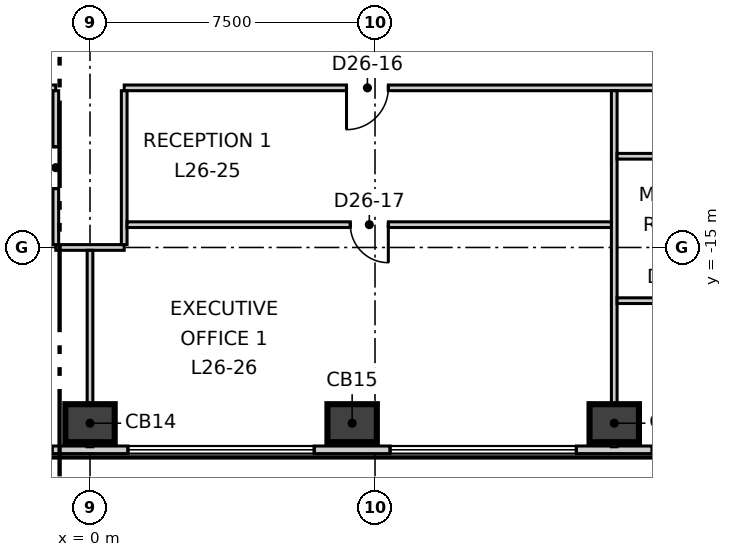
"""IFC4 building model, lengths in metres.
Left out: names, types, materials, properties, quantities, classifications, styles, units other than length and angle.
Written with IfcOpenShell. Run it as: python <this file> out.ifc"""

import sys

from ifc_helpers import new_model, si_unit, direction, frame, frame_2d, origin, origin_2d, place, context, subcontext, project, spatial, rectangle, extrude, element, fill, save


model = new_model("IFC4")
c1 = context("Model", 3, precision=1e-05, world=origin(), true_north=direction((0.0, 1.0)))
c2 = subcontext(c1, "Body", "Model", "MODEL_VIEW")
j1 = project(units=[si_unit("LENGTHUNIT", "METRE"), si_unit("PLANEANGLEUNIT", "RADIAN")], contexts=[c1])
p1 = place(None, origin())
s1 = spatial("IfcSite", under=j1, at=p1, CompositionType="ELEMENT")
p2 = place(p1, origin())
s2 = spatial("IfcBuilding", under=s1, at=p2, CompositionType="ELEMENT")
p3 = place(p2, frame((0.0, 0.0, 116.3)))
s3 = spatial("IfcBuildingStorey", under=s2, at=p3, CompositionType="ELEMENT", Elevation=116.3)
for number, where, z_axis, x_axis in (
    (1, (0.0, -19.624, -0.3), (0.0, 0.0, 1.0), (1.0, 0.0, 0.0)),
    (2, (6.898, -19.624, -0.3), (0.0, 0.0, 1.0), (1.0, 0.0, 0.0)),
    (3, (13.795, -19.624, -0.3), (0.0, 0.0, 1.0), (1.0, 0.0, 0.0)),
):
    element("IfcColumn", number, at=place(p3, frame(where, z_axis=z_axis, x_axis=x_axis)), inside=s3, PredefinedType="COLUMN", context=c2, shape_type="SweptSolid", body=[
        extrude(rectangle(XDim=1.3, YDim=1.0, at=origin_2d()), origin(), (0.0, 0.0, 1.0), 4.0),
    ])
p4 = place(p3, frame((-28.894, -20.324, 0.0), z_axis=(0.0, 0.0, 1.0), x_axis=(1.0, 0.0, 0.0)))
e4 = element("IfcWall", 4, at=p4, inside=s3, PredefinedType="ELEMENTEDWALL", context=c2, shape_type="SweptSolid", body=[
    extrude(rectangle(XDim=57.768, YDim=0.2, at=frame_2d((28.884, 0.0))), origin(), (0.0, 0.0, 1.0), 3.7),
])
p5 = place(p4, frame((2.302, 0.0, 0.9)))
e5 = element("IfcOpeningElement", 5, at=p5, cuts=e4, PredefinedType="OPENING", context=c2, shape_type="SweptSolid", body=[
    extrude(rectangle(XDim=4.9, YDim=2.5, at=frame_2d((2.45, 1.25))), frame((0.0, 0.11, 0.0), z_axis=(0.0, -1.0, 0.0), x_axis=(1.0, 0.0, 0.0)), (0.0, 0.0, 1.0), 0.22),
])
p6 = place(p4, frame((9.2, 0.0, 0.9)))
e6 = element("IfcOpeningElement", 6, at=p6, cuts=e4, PredefinedType="OPENING", context=c2, shape_type="SweptSolid", body=[
    extrude(rectangle(XDim=4.9, YDim=2.5, at=frame_2d((2.45, 1.25))), frame((0.0, 0.11, 0.0), z_axis=(0.0, -1.0, 0.0), x_axis=(1.0, 0.0, 0.0)), (0.0, 0.0, 1.0), 0.22),
])
p7 = place(p4, frame((16.097, 0.0, 0.9)))
e7 = element("IfcOpeningElement", 7, at=p7, cuts=e4, PredefinedType="OPENING", context=c2, shape_type="SweptSolid", body=[
    extrude(rectangle(XDim=4.9, YDim=2.5, at=frame_2d((2.45, 1.25))), frame((0.0, 0.11, 0.0), z_axis=(0.0, -1.0, 0.0), x_axis=(1.0, 0.0, 0.0)), (0.0, 0.0, 1.0), 0.22),
])
p8 = place(p4, frame((22.995, 0.0, 0.9)))
e8 = element("IfcOpeningElement", 8, at=p8, cuts=e4, PredefinedType="OPENING", context=c2, shape_type="SweptSolid", body=[
    extrude(rectangle(XDim=4.9, YDim=2.5, at=frame_2d((2.45, 1.25))), frame((0.0, 0.11, 0.0), z_axis=(0.0, -1.0, 0.0), x_axis=(1.0, 0.0, 0.0)), (0.0, 0.0, 1.0), 0.22),
])
p9 = place(p4, frame((29.893, 0.0, 0.9)))
e9 = element("IfcOpeningElement", 9, at=p9, cuts=e4, PredefinedType="OPENING", context=c2, shape_type="SweptSolid", body=[
    extrude(rectangle(XDim=4.9, YDim=2.5, at=frame_2d((2.45, 1.25))), frame((0.0, 0.11, 0.0), z_axis=(0.0, -1.0, 0.0), x_axis=(1.0, 0.0, 0.0)), (0.0, 0.0, 1.0), 0.22),
])
p10 = place(p4, frame((36.791, 0.0, 0.9)))
e10 = element("IfcOpeningElement", 10, at=p10, cuts=e4, PredefinedType="OPENING", context=c2, shape_type="SweptSolid", body=[
    extrude(rectangle(XDim=4.9, YDim=2.5, at=frame_2d((2.45, 1.25))), frame((0.0, 0.11, 0.0), z_axis=(0.0, -1.0, 0.0), x_axis=(1.0, 0.0, 0.0)), (0.0, 0.0, 1.0), 0.22),
])
p11 = place(p4, frame((43.688, 0.0, 0.9)))
e11 = element("IfcOpeningElement", 11, at=p11, cuts=e4, PredefinedType="OPENING", context=c2, shape_type="SweptSolid", body=[
    extrude(rectangle(XDim=4.9, YDim=2.5, at=frame_2d((2.45, 1.25))), frame((0.0, 0.11, 0.0), z_axis=(0.0, -1.0, 0.0), x_axis=(1.0, 0.0, 0.0)), (0.0, 0.0, 1.0), 0.22),
])
p12 = place(p4, frame((50.586, 0.0, 0.9)))
e12 = element("IfcOpeningElement", 12, at=p12, cuts=e4, PredefinedType="OPENING", context=c2, shape_type="SweptSolid", body=[
    extrude(rectangle(XDim=4.9, YDim=2.5, at=frame_2d((2.45, 1.25))), frame((0.0, 0.11, 0.0), z_axis=(0.0, -1.0, 0.0), x_axis=(1.0, 0.0, 0.0)), (0.0, 0.0, 1.0), 0.22),
])
p13 = place(p3, frame((32.048, -14.861, 0.0), z_axis=(0.0, 0.0, 1.0), x_axis=(-0.499996704161, 0.866027306629, 0.0)))
e13 = element("IfcWall", 13, at=p13, inside=s3, PredefinedType="ELEMENTEDWALL", context=c2, shape_type="SweptSolid", body=[
    extrude(rectangle(XDim=57.769, YDim=0.2, at=frame_2d((28.884, 0.0))), origin(), (0.0, 0.0, 1.0), 3.7),
])
p14 = place(p13, frame((2.302, 0.0, 0.9)))
e14 = element("IfcOpeningElement", 14, at=p14, cuts=e13, PredefinedType="OPENING", context=c2, shape_type="SweptSolid", body=[
    extrude(rectangle(XDim=4.9, YDim=2.5, at=frame_2d((2.45, 1.25))), frame((0.0, 0.11, 0.0), z_axis=(0.0, -1.0, 0.0), x_axis=(1.0, 0.0, 0.0)), (0.0, 0.0, 1.0), 0.22),
])
p15 = place(p13, frame((9.199, 0.0, 0.9)))
e15 = element("IfcOpeningElement", 15, at=p15, cuts=e13, PredefinedType="OPENING", context=c2, shape_type="SweptSolid", body=[
    extrude(rectangle(XDim=4.9, YDim=2.5, at=frame_2d((2.45, 1.25))), frame((0.0, 0.11, 0.0), z_axis=(0.0, -1.0, 0.0), x_axis=(1.0, 0.0, 0.0)), (0.0, 0.0, 1.0), 0.22),
])
p16 = place(p13, frame((16.097, 0.0, 0.9)))
e16 = element("IfcOpeningElement", 16, at=p16, cuts=e13, PredefinedType="OPENING", context=c2, shape_type="SweptSolid", body=[
    extrude(rectangle(XDim=4.9, YDim=2.5, at=frame_2d((2.45, 1.25))), frame((0.0, 0.11, 0.0), z_axis=(0.0, -1.0, 0.0), x_axis=(1.0, 0.0, 0.0)), (0.0, 0.0, 1.0), 0.22),
])
p17 = place(p13, frame((22.995, 0.0, 0.9)))
e17 = element("IfcOpeningElement", 17, at=p17, cuts=e13, PredefinedType="OPENING", context=c2, shape_type="SweptSolid", body=[
    extrude(rectangle(XDim=4.9, YDim=2.5, at=frame_2d((2.45, 1.25))), frame((0.0, 0.11, 0.0), z_axis=(0.0, -1.0, 0.0), x_axis=(1.0, 0.0, 0.0)), (0.0, 0.0, 1.0), 0.22),
])
p18 = place(p13, frame((29.893, 0.0, 0.9)))
e18 = element("IfcOpeningElement", 18, at=p18, cuts=e13, PredefinedType="OPENING", context=c2, shape_type="SweptSolid", body=[
    extrude(rectangle(XDim=4.9, YDim=2.5, at=frame_2d((2.45, 1.25))), frame((0.0, 0.11, 0.0), z_axis=(0.0, -1.0, 0.0), x_axis=(1.0, 0.0, 0.0)), (0.0, 0.0, 1.0), 0.22),
])
p19 = place(p13, frame((36.791, 0.0, 0.9)))
e19 = element("IfcOpeningElement", 19, at=p19, cuts=e13, PredefinedType="OPENING", context=c2, shape_type="SweptSolid", body=[
    extrude(rectangle(XDim=4.9, YDim=2.5, at=frame_2d((2.45, 1.25))), frame((0.0, 0.11, 0.0), z_axis=(0.0, -1.0, 0.0), x_axis=(1.0, 0.0, 0.0)), (0.0, 0.0, 1.0), 0.22),
])
p20 = place(p13, frame((43.689, 0.0, 0.9)))
e20 = element("IfcOpeningElement", 20, at=p20, cuts=e13, PredefinedType="OPENING", context=c2, shape_type="SweptSolid", body=[
    extrude(rectangle(XDim=4.9, YDim=2.5, at=frame_2d((2.45, 1.25))), frame((0.0, 0.11, 0.0), z_axis=(0.0, -1.0, 0.0), x_axis=(1.0, 0.0, 0.0)), (0.0, 0.0, 1.0), 0.22),
])
p21 = place(p13, frame((50.587, 0.0, 0.9)))
e21 = element("IfcOpeningElement", 21, at=p21, cuts=e13, PredefinedType="OPENING", context=c2, shape_type="SweptSolid", body=[
    extrude(rectangle(XDim=4.9, YDim=2.5, at=frame_2d((2.45, 1.25))), frame((0.0, 0.11, 0.0), z_axis=(0.0, -1.0, 0.0), x_axis=(1.0, 0.0, 0.0)), (0.0, 0.0, 1.0), 0.22),
])
p22 = place(p3, frame((-18.555, -10.8, 0.0), z_axis=(0.0, 0.0, 1.0), x_axis=(1.0, 0.0, 0.0)))
e22 = element("IfcWall", 22, at=p22, inside=s3, PredefinedType="PARTITIONING", context=c2, shape_type="SweptSolid", body=[
    extrude(rectangle(XDim=17.654, YDim=0.15, at=frame_2d((8.827, 0.0))), origin(), (0.0, 0.0, 1.0), 3.7),
])
p23 = place(p22, frame((1.8, 0.0, 0.0)))
e23 = element("IfcOpeningElement", 23, at=p23, cuts=e22, PredefinedType="OPENING", context=c2, shape_type="SweptSolid", body=[
    extrude(rectangle(XDim=1.1, YDim=2.1, at=frame_2d((0.55, 1.05))), frame((0.0, 0.085, 0.0), z_axis=(0.0, -1.0, 0.0), x_axis=(1.0, 0.0, 0.0)), (0.0, 0.0, 1.0), 0.17),
])
p24 = place(p22, frame((5.909, 0.0, 0.0)))
e24 = element("IfcOpeningElement", 24, at=p24, cuts=e22, PredefinedType="OPENING", context=c2, shape_type="SweptSolid", body=[
    extrude(rectangle(XDim=0.9, YDim=2.1, at=frame_2d((0.45, 1.05))), frame((0.0, 0.085, 0.0), z_axis=(0.0, -1.0, 0.0), x_axis=(1.0, 0.0, 0.0)), (0.0, 0.0, 1.0), 0.17),
])
p25 = place(p22, frame((9.109, 0.0, 0.0)))
e25 = element("IfcOpeningElement", 25, at=p25, cuts=e22, PredefinedType="OPENING", context=c2, shape_type="SweptSolid", body=[
    extrude(rectangle(XDim=0.9, YDim=2.1, at=frame_2d((0.45, 1.05))), frame((0.0, 0.085, 0.0), z_axis=(0.0, -1.0, 0.0), x_axis=(1.0, 0.0, 0.0)), (0.0, 0.0, 1.0), 0.17),
])
p26 = place(p22, frame((11.809, 0.0, 0.0)))
e26 = element("IfcOpeningElement", 26, at=p26, cuts=e22, PredefinedType="OPENING", context=c2, shape_type="SweptSolid", body=[
    extrude(rectangle(XDim=1.0, YDim=2.1, at=frame_2d((0.5, 1.05))), frame((0.0, 0.085, 0.0), z_axis=(0.0, -1.0, 0.0), x_axis=(1.0, 0.0, 0.0)), (0.0, 0.0, 1.0), 0.17),
])
p27 = place(p3, frame((0.901, -10.8, 0.0), z_axis=(0.0, 0.0, 1.0), x_axis=(1.0, 0.0, 0.0)))
e27 = element("IfcWall", 27, at=p27, inside=s3, PredefinedType="PARTITIONING", context=c2, shape_type="SweptSolid", body=[
    extrude(rectangle(XDim=17.804, YDim=0.15, at=frame_2d((8.902, 0.0))), origin(), (0.0, 0.0, 1.0), 3.7),
])
p28 = place(p27, frame((5.849, 0.0, 0.0)))
e28 = element("IfcOpeningElement", 28, at=p28, cuts=e27, PredefinedType="OPENING", context=c2, shape_type="SweptSolid", body=[
    extrude(rectangle(XDim=1.1, YDim=2.1, at=frame_2d((0.55, 1.05))), frame((0.0, 0.085, 0.0), z_axis=(0.0, -1.0, 0.0), x_axis=(1.0, 0.0, 0.0)), (0.0, 0.0, 1.0), 0.17),
])
p29 = place(p27, frame((14.844, 0.0, 0.0)))
e29 = element("IfcOpeningElement", 29, at=p29, cuts=e27, PredefinedType="OPENING", context=c2, shape_type="SweptSolid", body=[
    extrude(rectangle(XDim=1.1, YDim=2.1, at=frame_2d((0.55, 1.05))), frame((0.0, 0.085, 0.0), z_axis=(0.0, -1.0, 0.0), x_axis=(1.0, 0.0, 0.0)), (0.0, 0.0, 1.0), 0.17),
])
p30 = place(p3, frame((-0.9, -15.0, 0.0), z_axis=(0.0, 0.0, 1.0), x_axis=(1.0, 0.0, 0.0)))
e30 = element("IfcWall", 30, at=p30, inside=s3, PredefinedType="PARTITIONING", context=c2, shape_type="SweptSolid", body=[
    extrude(rectangle(XDim=1.8, YDim=0.15, at=frame_2d((0.9, 0.0))), origin(), (0.0, 0.0, 1.0), 3.7),
])
p31 = place(p3, frame((-0.9, -14.925, 0.0), z_axis=(0.0, 0.0, 1.0), x_axis=(0.0, 1.0, 0.0)))
e31 = element("IfcWall", 31, at=p31, inside=s3, PredefinedType="PARTITIONING", context=c2, shape_type="SweptSolid", body=[
    extrude(rectangle(XDim=4.049, YDim=0.15, at=frame_2d((2.024, 0.0))), origin(), (0.0, 0.0, 1.0), 3.7),
])
p32 = place(p31, frame((1.475, 0.0, 0.0)))
e32 = element("IfcOpeningElement", 32, at=p32, cuts=e31, PredefinedType="OPENING", context=c2, shape_type="SweptSolid", body=[
    extrude(rectangle(XDim=1.1, YDim=2.1, at=frame_2d((0.55, 1.05))), frame((0.0, 0.085, 0.0), z_axis=(0.0, -1.0, 0.0), x_axis=(1.0, 0.0, 0.0)), (0.0, 0.0, 1.0), 0.17),
])
p33 = place(p3, frame((0.0, -20.244, 0.0), z_axis=(0.0, 0.0, 1.0), x_axis=(0.0, 1.0, 0.0)))
e33 = element("IfcWall", 33, at=p33, inside=s3, PredefinedType="PARTITIONING", context=c2, shape_type="SweptSolid", body=[
    extrude(rectangle(XDim=5.169, YDim=0.15, at=frame_2d((2.584, 0.0))), origin(), (0.0, 0.0, 1.0), 3.2),
])
p34 = place(p3, frame((0.9, -14.925, 0.0), z_axis=(0.0, 0.0, 1.0), x_axis=(0.0, 1.0, 0.0)))
e34 = element("IfcWall", 34, at=p34, inside=s3, PredefinedType="PARTITIONING", context=c2, shape_type="SweptSolid", body=[
    extrude(rectangle(XDim=4.049, YDim=0.15, at=frame_2d((2.024, 0.0))), origin(), (0.0, 0.0, 1.0), 3.7),
])
p35 = place(p3, frame((9.803, 4.62, 0.0), z_axis=(0.0, 0.0, 1.0), x_axis=(0.500023004316, -0.866012121829, 0.0)))
e35 = element("IfcWall", 35, at=p35, inside=s3, PredefinedType="PARTITIONING", context=c2, shape_type="SweptSolid", body=[
    extrude(rectangle(XDim=17.719, YDim=0.15, at=frame_2d((8.86, 0.0))), origin(), (0.0, 0.0, 1.0), 3.7),
])
p36 = place(p35, frame((14.756, 0.0, 0.0)))
e36 = element("IfcOpeningElement", 36, at=p36, cuts=e35, PredefinedType="OPENING", context=c2, shape_type="SweptSolid", body=[
    extrude(rectangle(XDim=1.1, YDim=2.1, at=frame_2d((0.55, 1.05))), frame((0.0, 0.085, 0.0), z_axis=(0.0, -1.0, 0.0), x_axis=(1.0, 0.0, 0.0)), (0.0, 0.0, 1.0), 0.17),
])
p37 = place(p35, frame((4.645, 0.0, 0.0)))
e37 = element("IfcOpeningElement", 37, at=p37, cuts=e35, PredefinedType="OPENING", context=c2, shape_type="SweptSolid", body=[
    extrude(rectangle(XDim=1.1, YDim=2.1, at=frame_2d((0.55, 1.05))), frame((0.0, 0.085, 0.0), z_axis=(0.0, -1.0, 0.0), x_axis=(1.0, 0.0, 0.0)), (0.0, 0.0, 1.0), 0.17),
])
p38 = place(p35, frame((11.145, 0.0, 0.0)))
e38 = element("IfcOpeningElement", 38, at=p38, cuts=e35, PredefinedType="OPENING", context=c2, shape_type="SweptSolid", body=[
    extrude(rectangle(XDim=0.9, YDim=2.1, at=frame_2d((0.45, 1.05))), frame((0.0, 0.085, 0.0), z_axis=(0.0, -1.0, 0.0), x_axis=(1.0, 0.0, 0.0)), (0.0, 0.0, 1.0), 0.17),
])
p39 = place(p35, frame((8.745, 0.0, 0.0)))
e39 = element("IfcOpeningElement", 39, at=p39, cuts=e35, PredefinedType="OPENING", context=c2, shape_type="SweptSolid", body=[
    extrude(rectangle(XDim=0.9, YDim=2.1, at=frame_2d((0.45, 1.05))), frame((0.0, 0.085, 0.0), z_axis=(0.0, -1.0, 0.0), x_axis=(1.0, 0.0, 0.0)), (0.0, 0.0, 1.0), 0.17),
])
p40 = place(p3, frame((13.795, -20.244, 0.0), z_axis=(0.0, 0.0, 1.0), x_axis=(0.0, 1.0, 0.0)))
e40 = element("IfcWall", 40, at=p40, inside=s3, PredefinedType="PARTITIONING", context=c2, shape_type="SweptSolid", body=[
    extrude(rectangle(XDim=9.369, YDim=0.15, at=frame_2d((4.685, 0.0))), origin(), (0.0, 0.0, 1.0), 3.7),
])
p41 = place(p3, frame((0.975, -14.4, 0.0), z_axis=(0.0, 0.0, 1.0), x_axis=(1.0, 0.0, 0.0)))
e41 = element("IfcWall", 41, at=p41, inside=s3, PredefinedType="PARTITIONING", context=c2, shape_type="SweptSolid", body=[
    extrude(rectangle(XDim=12.745, YDim=0.15, at=frame_2d((6.373, 0.0))), origin(), (0.0, 0.0, 1.0), 3.7),
])
p42 = place(p41, frame((5.875, 0.0, 0.0)))
e42 = element("IfcOpeningElement", 42, at=p42, cuts=e41, PredefinedType="OPENING", context=c2, shape_type="SweptSolid", body=[
    extrude(rectangle(XDim=1.0, YDim=2.1, at=frame_2d((0.5, 1.05))), frame((0.0, 0.085, 0.0), z_axis=(0.0, -1.0, 0.0), x_axis=(1.0, 0.0, 0.0)), (0.0, 0.0, 1.0), 0.17),
])
p43 = place(p3, frame((13.87, -16.4, 0.0), z_axis=(0.0, 0.0, 1.0), x_axis=(1.0, 0.0, 0.0)))
e43 = element("IfcWall", 43, at=p43, inside=s3, PredefinedType="PARTITIONING", context=c2, shape_type="SweptSolid", body=[
    extrude(rectangle(XDim=3.525, YDim=0.15, at=frame_2d((1.762, 0.0))), origin(), (0.0, 0.0, 1.0), 3.7),
])
p44 = place(p43, frame((1.275, 0.0, 0.0)))
e44 = element("IfcOpeningElement", 44, at=p44, cuts=e43, PredefinedType="OPENING", context=c2, shape_type="SweptSolid", body=[
    extrude(rectangle(XDim=0.9, YDim=2.1, at=frame_2d((0.45, 1.05))), frame((0.0, 0.085, 0.0), z_axis=(0.0, -1.0, 0.0), x_axis=(1.0, 0.0, 0.0)), (0.0, 0.0, 1.0), 0.17),
])
p45 = place(p3, frame((13.87, -12.6, 0.0), z_axis=(0.0, 0.0, 1.0), x_axis=(1.0, 0.0, 0.0)))
e45 = element("IfcWall", 45, at=p45, inside=s3, PredefinedType="PARTITIONING", context=c2, shape_type="SweptSolid", body=[
    extrude(rectangle(XDim=5.725, YDim=0.15, at=frame_2d((2.862, 0.0))), origin(), (0.0, 0.0, 1.0), 3.7),
])
p46 = place(p8, origin())
e46 = element("IfcWindow", 46, at=p46, inside=s3, PartitioningType="SINGLE_PANEL", PredefinedType="WINDOW", context=c2, shape_type="SweptSolid", body=[
    extrude(rectangle(XDim=4.9, YDim=2.5, at=frame_2d((2.45, 1.25))), frame((0.0, 0.03, 0.0), z_axis=(0.0, -1.0, 0.0), x_axis=(1.0, 0.0, 0.0)), (0.0, 0.0, 1.0), 0.06),
])
fill(e8, e46)
p47 = place(p9, origin())
e47 = element("IfcWindow", 47, at=p47, inside=s3, PartitioningType="SINGLE_PANEL", PredefinedType="WINDOW", context=c2, shape_type="SweptSolid", body=[
    extrude(rectangle(XDim=4.9, YDim=2.5, at=frame_2d((2.45, 1.25))), frame((0.0, 0.03, 0.0), z_axis=(0.0, -1.0, 0.0), x_axis=(1.0, 0.0, 0.0)), (0.0, 0.0, 1.0), 0.06),
])
fill(e9, e47)
p48 = place(p10, origin())
e48 = element("IfcWindow", 48, at=p48, inside=s3, PartitioningType="SINGLE_PANEL", PredefinedType="WINDOW", context=c2, shape_type="SweptSolid", body=[
    extrude(rectangle(XDim=4.9, YDim=2.5, at=frame_2d((2.45, 1.25))), frame((0.0, 0.03, 0.0), z_axis=(0.0, -1.0, 0.0), x_axis=(1.0, 0.0, 0.0)), (0.0, 0.0, 1.0), 0.06),
])
fill(e10, e48)
p49 = place(p11, origin())
e49 = element("IfcWindow", 49, at=p49, inside=s3, PartitioningType="SINGLE_PANEL", PredefinedType="WINDOW", context=c2, shape_type="SweptSolid", body=[
    extrude(rectangle(XDim=4.9, YDim=2.5, at=frame_2d((2.45, 1.25))), frame((0.0, 0.03, 0.0), z_axis=(0.0, -1.0, 0.0), x_axis=(1.0, 0.0, 0.0)), (0.0, 0.0, 1.0), 0.06),
])
fill(e11, e49)
p50 = place(p32, origin())
e50 = element("IfcDoor", 50, at=p50, inside=s3, OperationType="SINGLE_SWING_LEFT", PredefinedType="DOOR", context=c2, shape_type="SweptSolid", body=[
    extrude(rectangle(XDim=1.1, YDim=2.1, at=frame_2d((0.55, 1.05))), frame((0.0, 0.025, 0.0), z_axis=(0.0, -1.0, 0.0), x_axis=(1.0, 0.0, 0.0)), (0.0, 0.0, 1.0), 0.05),
])
fill(e32, e50)
p51 = place(p28, origin())
e51 = element("IfcDoor", 51, at=p51, inside=s3, OperationType="SINGLE_SWING_LEFT", PredefinedType="DOOR", context=c2, shape_type="SweptSolid", body=[
    extrude(rectangle(XDim=1.1, YDim=2.1, at=frame_2d((0.55, 1.05))), frame((0.0, 0.025, 0.0), z_axis=(0.0, -1.0, 0.0), x_axis=(1.0, 0.0, 0.0)), (0.0, 0.0, 1.0), 0.05),
])
fill(e28, e51)
p52 = place(p42, origin())
e52 = element("IfcDoor", 52, at=p52, inside=s3, OperationType="SINGLE_SWING_RIGHT", PredefinedType="DOOR", context=c2, shape_type="SweptSolid", body=[
    extrude(rectangle(XDim=1.0, YDim=2.1, at=frame_2d((0.5, 1.05))), frame((0.0, 0.025, 0.0), z_axis=(0.0, -1.0, 0.0), x_axis=(1.0, 0.0, 0.0)), (0.0, 0.0, 1.0), 0.05),
])
fill(e42, e52)
save(model, sys.argv[1])
